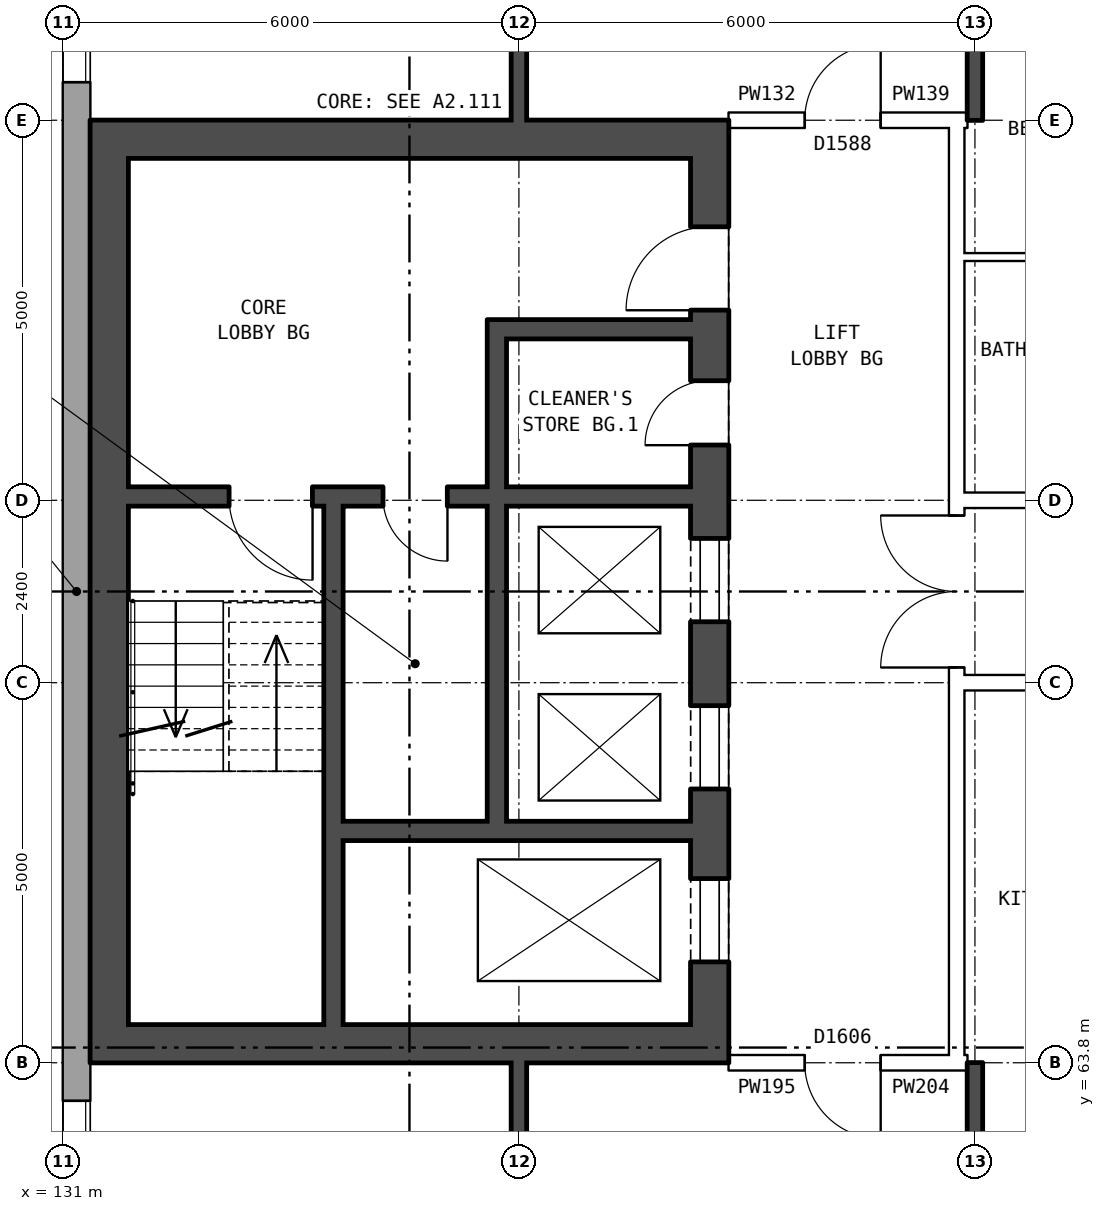
"""IFC4 building model, lengths in metres.
Left out: names, types, materials, properties, quantities, classifications, styles, units other than length and angle.
Written with IfcOpenShell. Run it as: python <this file> out.ifc"""

import sys

from ifc_helpers import new_model, si_unit, direction, frame, frame_2d, origin, place, context, subcontext, project, spatial, rectangle, extrude, element, fill, save


model = new_model("IFC4")
c1 = context("Model", 3, precision=1e-05, world=origin(), true_north=direction((0.0, 1.0)))
c2 = subcontext(c1, "Body", "Model", "MODEL_VIEW")
j1 = project(units=[si_unit("LENGTHUNIT", "METRE"), si_unit("PLANEANGLEUNIT", "RADIAN")], contexts=[c1])
p1 = place(None, origin())
s1 = spatial("IfcSite", under=j1, at=p1, CompositionType="ELEMENT")
p2 = place(p1, origin())
s2 = spatial("IfcBuilding", under=s1, at=p2, CompositionType="ELEMENT")
p3 = place(p2, frame((0.0, 0.0, 148.5)))
s3 = spatial("IfcBuildingStorey", under=s2, at=p3, CompositionType="ELEMENT", Elevation=148.5)
p4 = place(p3, frame((131.18, 82.925, 0.0), z_axis=(0.0, 0.0, 1.0), x_axis=(0.0, -1.0, 0.0)))
e1 = element("IfcWall", 1, at=p4, inside=s3, PredefinedType="STANDARD", context=c2, shape_type="SweptSolid", body=[
    extrude(rectangle(XDim=25.851, YDim=0.36, at=frame_2d((12.925, 0.0))), origin(), (0.0, 0.0, 1.0), 2.85),
])
p5 = place(p4, frame((1.375, 0.0, 0.8)))
e2 = element("IfcOpeningElement", 2, at=p5, cuts=e1, PredefinedType="OPENING", context=c2, shape_type="SweptSolid", body=[
    extrude(rectangle(XDim=1.0, YDim=1.2, at=frame_2d((0.5, 0.6))), frame((0.0, 0.19, 0.0), z_axis=(0.0, -1.0, 0.0), x_axis=(1.0, 0.0, 0.0)), (0.0, 0.0, 1.0), 0.38),
])
p6 = place(p4, frame((4.625, 0.0, 0.8)))
e3 = element("IfcOpeningElement", 3, at=p6, cuts=e1, PredefinedType="OPENING", context=c2, shape_type="SweptSolid", body=[
    extrude(rectangle(XDim=1.6, YDim=1.8, at=frame_2d((0.8, 0.9))), frame((0.0, 0.19, 0.0), z_axis=(0.0, -1.0, 0.0), x_axis=(1.0, 0.0, 0.0)), (0.0, 0.0, 1.0), 0.38),
])
p7 = place(p4, frame((19.625, 0.0, 0.8)))
e4 = element("IfcOpeningElement", 4, at=p7, cuts=e1, PredefinedType="OPENING", context=c2, shape_type="SweptSolid", body=[
    extrude(rectangle(XDim=1.6, YDim=1.8, at=frame_2d((0.8, 0.9))), frame((0.0, 0.19, 0.0), z_axis=(0.0, -1.0, 0.0), x_axis=(1.0, 0.0, 0.0)), (0.0, 0.0, 1.0), 0.38),
])
p8 = place(p4, frame((21.525, 0.0, 0.8)))
e5 = element("IfcOpeningElement", 5, at=p8, cuts=e1, PredefinedType="OPENING", context=c2, shape_type="SweptSolid", body=[
    extrude(rectangle(XDim=1.4, YDim=1.8, at=frame_2d((0.7, 0.9))), frame((0.0, 0.19, 0.0), z_axis=(0.0, -1.0, 0.0), x_axis=(1.0, 0.0, 0.0)), (0.0, 0.0, 1.0), 0.38),
])
p9 = place(p4, frame((2.675, 0.0, 0.8)))
e6 = element("IfcOpeningElement", 6, at=p9, cuts=e1, PredefinedType="OPENING", context=c2, shape_type="SweptSolid", body=[
    extrude(rectangle(XDim=1.4, YDim=1.8, at=frame_2d((0.7, 0.9))), frame((0.0, 0.19, 0.0), z_axis=(0.0, -1.0, 0.0), x_axis=(1.0, 0.0, 0.0)), (0.0, 0.0, 1.0), 0.38),
])
p10 = place(p4, frame((23.225, 0.0, 0.8)))
e7 = element("IfcOpeningElement", 7, at=p10, cuts=e1, PredefinedType="OPENING", context=c2, shape_type="SweptSolid", body=[
    extrude(rectangle(XDim=1.0, YDim=1.2, at=frame_2d((0.5, 0.6))), frame((0.0, 0.19, 0.0), z_axis=(0.0, -1.0, 0.0), x_axis=(1.0, 0.0, 0.0)), (0.0, 0.0, 1.0), 0.38),
])
p11 = place(p3, frame((139.51, 63.8, 0.0), z_axis=(0.0, 0.0, 1.0), x_axis=(0.0, 1.0, 0.0)))
e8 = element("IfcWall", 8, at=p11, inside=s3, PredefinedType="SHEAR", context=c2, shape_type="SweptSolid", body=[
    extrude(rectangle(XDim=12.4, YDim=0.5, at=frame_2d((6.2, 0.0))), origin(), (0.0, 0.0, 1.0), 2.85),
])
p12 = place(p11, frame((1.325, 0.0, 0.0)))
e9 = element("IfcOpeningElement", 9, at=p12, cuts=e8, PredefinedType="OPENING", context=c2, shape_type="SweptSolid", body=[
    extrude(rectangle(XDim=1.1, YDim=2.1, at=frame_2d((0.55, 1.05))), frame((0.0, 0.26, 0.0), z_axis=(0.0, -1.0, 0.0), x_axis=(1.0, 0.0, 0.0)), (0.0, 0.0, 1.0), 0.52),
])
p13 = place(p11, frame((3.6, 0.0, 0.0)))
e10 = element("IfcOpeningElement", 10, at=p13, cuts=e8, PredefinedType="OPENING", context=c2, shape_type="SweptSolid", body=[
    extrude(rectangle(XDim=1.1, YDim=2.1, at=frame_2d((0.55, 1.05))), frame((0.0, 0.26, 0.0), z_axis=(0.0, -1.0, 0.0), x_axis=(1.0, 0.0, 0.0)), (0.0, 0.0, 1.0), 0.52),
])
p14 = place(p11, frame((5.8, 0.0, 0.0)))
e11 = element("IfcOpeningElement", 11, at=p14, cuts=e8, PredefinedType="OPENING", context=c2, shape_type="SweptSolid", body=[
    extrude(rectangle(XDim=1.1, YDim=2.1, at=frame_2d((0.55, 1.05))), frame((0.0, 0.26, 0.0), z_axis=(0.0, -1.0, 0.0), x_axis=(1.0, 0.0, 0.0)), (0.0, 0.0, 1.0), 0.52),
])
p15 = place(p11, frame((9.9, 0.0, 0.0)))
e12 = element("IfcOpeningElement", 12, at=p15, cuts=e8, PredefinedType="OPENING", context=c2, shape_type="SweptSolid", body=[
    extrude(rectangle(XDim=1.1, YDim=2.1, at=frame_2d((0.55, 1.05))), frame((0.0, 0.26, 0.0), z_axis=(0.0, -1.0, 0.0), x_axis=(1.0, 0.0, 0.0)), (0.0, 0.0, 1.0), 0.52),
])
p16 = place(p11, frame((8.125, 0.0, 0.0)))
e13 = element("IfcOpeningElement", 13, at=p16, cuts=e8, PredefinedType="OPENING", context=c2, shape_type="SweptSolid", body=[
    extrude(rectangle(XDim=0.85, YDim=2.1, at=frame_2d((0.425, 1.05))), frame((0.0, 0.26, 0.0), z_axis=(0.0, -1.0, 0.0), x_axis=(1.0, 0.0, 0.0)), (0.0, 0.0, 1.0), 0.52),
])
p17 = place(p3, frame((131.61, 63.8, 0.0), z_axis=(0.0, 0.0, 1.0), x_axis=(0.0, 1.0, 0.0)))
e14 = element("IfcWall", 14, at=p17, inside=s3, PredefinedType="SHEAR", context=c2, shape_type="SweptSolid", body=[
    extrude(rectangle(XDim=12.4, YDim=0.5, at=frame_2d((6.2, 0.0))), origin(), (0.0, 0.0, 1.0), 2.85),
])
for number, where, z_axis, x_axis in (
    (15, (139.26, 64.05, 0.0), (0.0, 0.0, 1.0), (-1.0, 0.0, 0.0)),
    (16, (139.26, 75.95, 0.0), (0.0, 0.0, 1.0), (-1.0, 0.0, 0.0)),
):
    element("IfcWall", number, at=place(p3, frame(where, z_axis=z_axis, x_axis=x_axis)), inside=s3, PredefinedType="SHEAR", context=c2, shape_type="SweptSolid", body=[
        extrude(rectangle(XDim=7.4, YDim=0.5, at=frame_2d((3.7, 0.0))), origin(), (0.0, 0.0, 1.0), 2.85),
    ])
p18 = place(p3, frame((139.26, 66.85, 0.0), z_axis=(0.0, 0.0, 1.0), x_axis=(-1.0, 0.0, 0.0)))
e17 = element("IfcWall", 17, at=p18, inside=s3, PredefinedType="SHEAR", context=c2, shape_type="SweptSolid", body=[
    extrude(rectangle(XDim=4.575, YDim=0.25, at=frame_2d((2.288, 0.0))), origin(), (0.0, 0.0, 1.0), 2.85),
])
p19 = place(p3, frame((139.26, 71.25, 0.0), z_axis=(0.0, 0.0, 1.0), x_axis=(-1.0, 0.0, 0.0)))
e18 = element("IfcWall", 18, at=p19, inside=s3, PredefinedType="SHEAR", context=c2, shape_type="SweptSolid", body=[
    extrude(rectangle(XDim=7.4, YDim=0.25, at=frame_2d((3.7, 0.0))), origin(), (0.0, 0.0, 1.0), 2.85),
])
p20 = place(p19, frame((4.975, 0.0, 0.0)))
e19 = element("IfcOpeningElement", 19, at=p20, cuts=e18, PredefinedType="OPENING", context=c2, shape_type="SweptSolid", body=[
    extrude(rectangle(XDim=1.1, YDim=2.1, at=frame_2d((0.55, 1.05))), frame((0.0, 0.135, 0.0), z_axis=(0.0, -1.0, 0.0), x_axis=(1.0, 0.0, 0.0)), (0.0, 0.0, 1.0), 0.27),
])
p21 = place(p19, frame((3.2, 0.0, 0.0)))
e20 = element("IfcOpeningElement", 20, at=p21, cuts=e18, PredefinedType="OPENING", context=c2, shape_type="SweptSolid", body=[
    extrude(rectangle(XDim=0.85, YDim=2.1, at=frame_2d((0.425, 1.05))), frame((0.0, 0.135, 0.0), z_axis=(0.0, -1.0, 0.0), x_axis=(1.0, 0.0, 0.0)), (0.0, 0.0, 1.0), 0.27),
])
p22 = place(p3, frame((139.26, 73.45, 0.0), z_axis=(0.0, 0.0, 1.0), x_axis=(-1.0, 0.0, 0.0)))
e21 = element("IfcWall", 21, at=p22, inside=s3, PredefinedType="SHEAR", context=c2, shape_type="SweptSolid", body=[
    extrude(rectangle(XDim=2.425, YDim=0.25, at=frame_2d((1.212, 0.0))), origin(), (0.0, 0.0, 1.0), 2.85),
])
p23 = place(p3, frame((136.71, 66.975, 0.0), z_axis=(0.0, 0.0, 1.0), x_axis=(0.0, 1.0, 0.0)))
e22 = element("IfcWall", 22, at=p23, inside=s3, PredefinedType="SHEAR", context=c2, shape_type="SweptSolid", body=[
    extrude(rectangle(XDim=4.15, YDim=0.25, at=frame_2d((2.075, 0.0))), origin(), (0.0, 0.0, 1.0), 2.85),
])
p24 = place(p3, frame((136.71, 71.375, 0.0), z_axis=(0.0, 0.0, 1.0), x_axis=(0.0, 1.0, 0.0)))
e23 = element("IfcWall", 23, at=p24, inside=s3, PredefinedType="SHEAR", context=c2, shape_type="SweptSolid", body=[
    extrude(rectangle(XDim=2.2, YDim=0.25, at=frame_2d((1.1, 0.0))), origin(), (0.0, 0.0, 1.0), 2.85),
])
p25 = place(p3, frame((134.56, 64.3, 0.0), z_axis=(0.0, 0.0, 1.0), x_axis=(0.0, 1.0, 0.0)))
e24 = element("IfcWall", 24, at=p25, inside=s3, PredefinedType="SHEAR", context=c2, shape_type="SweptSolid", body=[
    extrude(rectangle(XDim=6.825, YDim=0.25, at=frame_2d((3.413, 0.0))), origin(), (0.0, 0.0, 1.0), 2.85),
])
p26 = place(p3, frame((142.76, 63.9, 0.0), z_axis=(0.0, 0.0, 1.0), x_axis=(0.0, 1.0, 0.0)))
e25 = element("IfcWall", 25, at=p26, inside=s3, PredefinedType="PARTITIONING", context=c2, shape_type="SweptSolid", body=[
    extrude(rectangle(XDim=12.2, YDim=0.2, at=frame_2d((6.1, 0.0))), origin(), (0.0, 0.0, 1.0), 2.85),
])
p27 = place(p26, frame((5.1, 0.0, 0.0)))
e26 = element("IfcOpeningElement", 26, at=p27, cuts=e25, PredefinedType="OPENING", context=c2, shape_type="SweptSolid", body=[
    extrude(rectangle(XDim=2.0, YDim=2.1, at=frame_2d((1.0, 1.05))), frame((0.0, 0.11, 0.0), z_axis=(0.0, -1.0, 0.0), x_axis=(1.0, 0.0, 0.0)), (0.0, 0.0, 1.0), 0.22),
])
p28 = place(p3, frame((139.76, 63.8, 0.0), z_axis=(0.0, 0.0, 1.0), x_axis=(1.0, 0.0, 0.0)))
e27 = element("IfcWall", 27, at=p28, inside=s3, PredefinedType="PARTITIONING", context=c2, shape_type="SweptSolid", body=[
    extrude(rectangle(XDim=3.0, YDim=0.2, at=frame_2d((1.5, 0.0))), origin(), (0.0, 0.0, 1.0), 2.85),
])
p29 = place(p28, frame((1.0, 0.0, 0.0)))
e28 = element("IfcOpeningElement", 28, at=p29, cuts=e27, PredefinedType="OPENING", context=c2, shape_type="SweptSolid", body=[
    extrude(rectangle(XDim=1.0, YDim=2.1, at=frame_2d((0.5, 1.05))), frame((0.0, 0.11, 0.0), z_axis=(0.0, -1.0, 0.0), x_axis=(1.0, 0.0, 0.0)), (0.0, 0.0, 1.0), 0.22),
])
p30 = place(p3, frame((142.76, 63.8, 0.0), z_axis=(0.0, 0.0, 1.0), x_axis=(1.0, 0.0, 0.0)))
e29 = element("IfcWall", 29, at=p30, inside=s3, PredefinedType="PARTITIONING", context=c2, shape_type="SweptSolid", body=[
    extrude(rectangle(XDim=0.14, YDim=0.2, at=frame_2d((0.07, 0.0))), origin(), (0.0, 0.0, 1.0), 2.85),
])
p31 = place(p3, frame((142.76, 68.8, 0.0), z_axis=(0.0, 0.0, 1.0), x_axis=(1.0, 0.0, 0.0)))
e30 = element("IfcWall", 30, at=p31, inside=s3, PredefinedType="PARTITIONING", context=c2, shape_type="SweptSolid", body=[
    extrude(rectangle(XDim=14.48, YDim=0.2, at=frame_2d((7.24, 0.0))), origin(), (0.0, 0.0, 1.0), 2.85),
])
p32 = place(p31, frame((1.12, 0.0, 0.0)))
e31 = element("IfcOpeningElement", 31, at=p32, cuts=e30, PredefinedType="OPENING", context=c2, shape_type="SweptSolid", body=[
    extrude(rectangle(XDim=1.0, YDim=2.1, at=frame_2d((0.5, 1.05))), frame((0.0, 0.11, 0.0), z_axis=(0.0, -1.0, 0.0), x_axis=(1.0, 0.0, 0.0)), (0.0, 0.0, 1.0), 0.22),
])
p33 = place(p31, frame((7.24, 0.0, 0.0)))
e32 = element("IfcOpeningElement", 32, at=p33, cuts=e30, PredefinedType="OPENING", context=c2, shape_type="SweptSolid", body=[
    extrude(rectangle(XDim=1.0, YDim=2.1, at=frame_2d((0.5, 1.05))), frame((0.0, 0.11, 0.0), z_axis=(0.0, -1.0, 0.0), x_axis=(1.0, 0.0, 0.0)), (0.0, 0.0, 1.0), 0.22),
])
p34 = place(p3, frame((142.76, 71.2, 0.0), z_axis=(0.0, 0.0, 1.0), x_axis=(1.0, 0.0, 0.0)))
e33 = element("IfcWall", 33, at=p34, inside=s3, PredefinedType="PARTITIONING", context=c2, shape_type="SweptSolid", body=[
    extrude(rectangle(XDim=14.48, YDim=0.2, at=frame_2d((7.24, 0.0))), origin(), (0.0, 0.0, 1.0), 2.85),
])
p35 = place(p34, frame((4.24, 0.0, 0.0)))
e34 = element("IfcOpeningElement", 34, at=p35, cuts=e33, PredefinedType="OPENING", context=c2, shape_type="SweptSolid", body=[
    extrude(rectangle(XDim=1.0, YDim=2.1, at=frame_2d((0.5, 1.05))), frame((0.0, 0.11, 0.0), z_axis=(0.0, -1.0, 0.0), x_axis=(1.0, 0.0, 0.0)), (0.0, 0.0, 1.0), 0.22),
])
p36 = place(p34, frame((10.24, 0.0, 0.0)))
e35 = element("IfcOpeningElement", 35, at=p36, cuts=e33, PredefinedType="OPENING", context=c2, shape_type="SweptSolid", body=[
    extrude(rectangle(XDim=1.0, YDim=2.1, at=frame_2d((0.5, 1.05))), frame((0.0, 0.11, 0.0), z_axis=(0.0, -1.0, 0.0), x_axis=(1.0, 0.0, 0.0)), (0.0, 0.0, 1.0), 0.22),
])
p37 = place(p3, frame((142.76, 74.4, 0.0), z_axis=(0.0, 0.0, 1.0), x_axis=(1.0, 0.0, 0.0)))
e36 = element("IfcWall", 36, at=p37, inside=s3, PredefinedType="PARTITIONING", context=c2, shape_type="SweptSolid", body=[
    extrude(rectangle(XDim=3.24, YDim=0.1, at=frame_2d((1.62, 0.0))), origin(), (0.0, 0.0, 1.0), 2.85),
])
p38 = place(p3, frame((139.76, 76.2, 0.0), z_axis=(0.0, 0.0, 1.0), x_axis=(1.0, 0.0, 0.0)))
e37 = element("IfcWall", 37, at=p38, inside=s3, PredefinedType="PARTITIONING", context=c2, shape_type="SweptSolid", body=[
    extrude(rectangle(XDim=3.0, YDim=0.2, at=frame_2d((1.5, 0.0))), origin(), (0.0, 0.0, 1.0), 2.85),
])
p39 = place(p38, frame((1.0, 0.0, 0.0)))
e38 = element("IfcOpeningElement", 38, at=p39, cuts=e37, PredefinedType="OPENING", context=c2, shape_type="SweptSolid", body=[
    extrude(rectangle(XDim=1.0, YDim=2.1, at=frame_2d((0.5, 1.05))), frame((0.0, 0.11, 0.0), z_axis=(0.0, -1.0, 0.0), x_axis=(1.0, 0.0, 0.0)), (0.0, 0.0, 1.0), 0.22),
])
p40 = place(p3, frame((142.76, 76.2, 0.0), z_axis=(0.0, 0.0, 1.0), x_axis=(1.0, 0.0, 0.0)))
e39 = element("IfcWall", 39, at=p40, inside=s3, PredefinedType="PARTITIONING", context=c2, shape_type="SweptSolid", body=[
    extrude(rectangle(XDim=0.14, YDim=0.2, at=frame_2d((0.07, 0.0))), origin(), (0.0, 0.0, 1.0), 2.85),
])
p41 = place(p3, frame((137.0, 54.36, 0.0), z_axis=(0.0, 0.0, 1.0), x_axis=(0.0, 1.0, 0.0)))
e40 = element("IfcWall", 40, at=p41, inside=s3, PredefinedType="SOLIDWALL", context=c2, shape_type="SweptSolid", body=[
    extrude(rectangle(XDim=9.44, YDim=0.2, at=frame_2d((4.72, 0.0))), origin(), (0.0, 0.0, 1.0), 2.85),
])
p42 = place(p41, frame((7.04, 0.0, 0.0)))
e41 = element("IfcOpeningElement", 41, at=p42, cuts=e40, PredefinedType="OPENING", context=c2, shape_type="SweptSolid", body=[
    extrude(rectangle(XDim=0.9, YDim=2.1, at=frame_2d((0.45, 1.05))), frame((0.0, 0.11, 0.0), z_axis=(0.0, -1.0, 0.0), x_axis=(1.0, 0.0, 0.0)), (0.0, 0.0, 1.0), 0.22),
])
p43 = place(p3, frame((137.0, 76.2, 0.0), z_axis=(0.0, 0.0, 1.0), x_axis=(0.0, 1.0, 0.0)))
e42 = element("IfcWall", 42, at=p43, inside=s3, PredefinedType="SOLIDWALL", context=c2, shape_type="SweptSolid", body=[
    extrude(rectangle(XDim=9.44, YDim=0.2, at=frame_2d((4.72, 0.0))), origin(), (0.0, 0.0, 1.0), 2.85),
])
p44 = place(p43, frame((7.17, 0.0, 0.0)))
e43 = element("IfcOpeningElement", 43, at=p44, cuts=e42, PredefinedType="OPENING", context=c2, shape_type="SweptSolid", body=[
    extrude(rectangle(XDim=0.9, YDim=2.1, at=frame_2d((0.45, 1.05))), frame((0.0, 0.11, 0.0), z_axis=(0.0, -1.0, 0.0), x_axis=(1.0, 0.0, 0.0)), (0.0, 0.0, 1.0), 0.22),
])
p45 = place(p43, frame((1.5, 0.0, 0.0)))
e44 = element("IfcOpeningElement", 44, at=p45, cuts=e42, PredefinedType="OPENING", context=c2, shape_type="SweptSolid", body=[
    extrude(rectangle(XDim=0.9, YDim=2.1, at=frame_2d((0.45, 1.05))), frame((0.0, 0.11, 0.0), z_axis=(0.0, -1.0, 0.0), x_axis=(1.0, 0.0, 0.0)), (0.0, 0.0, 1.0), 0.22),
])
for number, where, z_axis, x_axis in (
    (45, (143.0, 54.36, 0.0), (0.0, 0.0, 1.0), (0.0, 1.0, 0.0)),
    (46, (143.0, 76.2, 0.0), (0.0, 0.0, 1.0), (0.0, 1.0, 0.0)),
):
    element("IfcWall", number, at=place(p3, frame(where, z_axis=z_axis, x_axis=x_axis)), inside=s3, PredefinedType="SOLIDWALL", context=c2, shape_type="SweptSolid", body=[
        extrude(rectangle(XDim=9.44, YDim=0.2, at=frame_2d((4.72, 0.0))), origin(), (0.0, 0.0, 1.0), 2.85),
    ])
p46 = place(p6, origin())
e47 = element("IfcWindow", 47, at=p46, inside=s3, PartitioningType="SINGLE_PANEL", PredefinedType="WINDOW", context=c2, shape_type="SweptSolid", body=[
    extrude(rectangle(XDim=1.6, YDim=1.8, at=frame_2d((0.8, 0.9))), frame((0.0, 0.15, 0.0), z_axis=(0.0, -1.0, 0.0), x_axis=(1.0, 0.0, 0.0)), (0.0, 0.0, 1.0), 0.06),
])
fill(e3, e47)
p47 = place(p7, origin())
e48 = element("IfcWindow", 48, at=p47, inside=s3, PartitioningType="SINGLE_PANEL", PredefinedType="WINDOW", context=c2, shape_type="SweptSolid", body=[
    extrude(rectangle(XDim=1.6, YDim=1.8, at=frame_2d((0.8, 0.9))), frame((0.0, 0.15, 0.0), z_axis=(0.0, -1.0, 0.0), x_axis=(1.0, 0.0, 0.0)), (0.0, 0.0, 1.0), 0.06),
])
fill(e4, e48)
p48 = place(p12, origin())
e49 = element("IfcDoor", 49, at=p48, inside=s3, OperationType="DOUBLE_DOOR_SLIDING", PredefinedType="DOOR", context=c2, shape_type="SweptSolid", body=[
    extrude(rectangle(XDim=1.1, YDim=2.1, at=frame_2d((0.55, 1.05))), frame((0.0, 0.235, 0.0), z_axis=(0.0, -1.0, 0.0), x_axis=(1.0, 0.0, 0.0)), (0.0, 0.0, 1.0), 0.05),
])
fill(e9, e49)
p49 = place(p13, origin())
e50 = element("IfcDoor", 50, at=p49, inside=s3, OperationType="DOUBLE_DOOR_SLIDING", PredefinedType="DOOR", context=c2, shape_type="SweptSolid", body=[
    extrude(rectangle(XDim=1.1, YDim=2.1, at=frame_2d((0.55, 1.05))), frame((0.0, 0.235, 0.0), z_axis=(0.0, -1.0, 0.0), x_axis=(1.0, 0.0, 0.0)), (0.0, 0.0, 1.0), 0.05),
])
fill(e10, e50)
p50 = place(p14, origin())
e51 = element("IfcDoor", 51, at=p50, inside=s3, OperationType="DOUBLE_DOOR_SLIDING", PredefinedType="DOOR", context=c2, shape_type="SweptSolid", body=[
    extrude(rectangle(XDim=1.1, YDim=2.1, at=frame_2d((0.55, 1.05))), frame((0.0, 0.235, 0.0), z_axis=(0.0, -1.0, 0.0), x_axis=(1.0, 0.0, 0.0)), (0.0, 0.0, 1.0), 0.05),
])
fill(e11, e51)
p51 = place(p15, origin())
e52 = element("IfcDoor", 52, at=p51, inside=s3, OperationType="SINGLE_SWING_LEFT", PredefinedType="DOOR", context=c2, shape_type="SweptSolid", body=[
    extrude(rectangle(XDim=1.1, YDim=2.1, at=frame_2d((0.55, 1.05))), frame((0.0, 0.235, 0.0), z_axis=(0.0, -1.0, 0.0), x_axis=(1.0, 0.0, 0.0)), (0.0, 0.0, 1.0), 0.05),
])
fill(e12, e52)
p52 = place(p20, origin())
e53 = element("IfcDoor", 53, at=p52, inside=s3, OperationType="SINGLE_SWING_LEFT", PredefinedType="DOOR", context=c2, shape_type="SweptSolid", body=[
    extrude(rectangle(XDim=1.1, YDim=2.1, at=frame_2d((0.55, 1.05))), frame((0.0, 0.025, 0.0), z_axis=(0.0, -1.0, 0.0), x_axis=(1.0, 0.0, 0.0)), (0.0, 0.0, 1.0), 0.05),
])
fill(e19, e53)
p53 = place(p16, origin())
e54 = element("IfcDoor", 54, at=p53, inside=s3, OperationType="SINGLE_SWING_LEFT", PredefinedType="DOOR", context=c2, shape_type="SweptSolid", body=[
    extrude(rectangle(XDim=0.85, YDim=2.1, at=frame_2d((0.425, 1.05))), frame((0.0, 0.235, 0.0), z_axis=(0.0, -1.0, 0.0), x_axis=(1.0, 0.0, 0.0)), (0.0, 0.0, 1.0), 0.05),
])
fill(e13, e54)
p54 = place(p21, origin())
e55 = element("IfcDoor", 55, at=p54, inside=s3, OperationType="SINGLE_SWING_LEFT", PredefinedType="DOOR", context=c2, shape_type="SweptSolid", body=[
    extrude(rectangle(XDim=0.85, YDim=2.1, at=frame_2d((0.425, 1.05))), frame((0.0, 0.025, 0.0), z_axis=(0.0, -1.0, 0.0), x_axis=(1.0, 0.0, 0.0)), (0.0, 0.0, 1.0), 0.05),
])
fill(e20, e55)
p55 = place(p27, origin())
e56 = element("IfcDoor", 56, at=p55, inside=s3, OperationType="DOUBLE_DOOR_SINGLE_SWING", PredefinedType="DOOR", context=c2, shape_type="SweptSolid", body=[
    extrude(rectangle(XDim=2.0, YDim=2.1, at=frame_2d((1.0, 1.05))), frame((0.0, 0.025, 0.0), z_axis=(0.0, -1.0, 0.0), x_axis=(1.0, 0.0, 0.0)), (0.0, 0.0, 1.0), 0.05),
])
fill(e26, e56)
p56 = place(p29, frame((1.0, 0.0, 0.0), z_axis=(0.0, 0.0, 1.0), x_axis=(-1.0, 0.0, 0.0)))
e57 = element("IfcDoor", 57, at=p56, inside=s3, OperationType="SINGLE_SWING_LEFT", PredefinedType="DOOR", context=c2, shape_type="SweptSolid", body=[
    extrude(rectangle(XDim=1.0, YDim=2.1, at=frame_2d((0.5, 1.05))), frame((0.0, 0.025, 0.0), z_axis=(0.0, -1.0, 0.0), x_axis=(1.0, 0.0, 0.0)), (0.0, 0.0, 1.0), 0.05),
])
fill(e28, e57)
p57 = place(p39, origin())
e58 = element("IfcDoor", 58, at=p57, inside=s3, OperationType="SINGLE_SWING_RIGHT", PredefinedType="DOOR", context=c2, shape_type="SweptSolid", body=[
    extrude(rectangle(XDim=1.0, YDim=2.1, at=frame_2d((0.5, 1.05))), frame((0.0, 0.025, 0.0), z_axis=(0.0, -1.0, 0.0), x_axis=(1.0, 0.0, 0.0)), (0.0, 0.0, 1.0), 0.05),
])
fill(e38, e58)
save(model, sys.argv[1])
